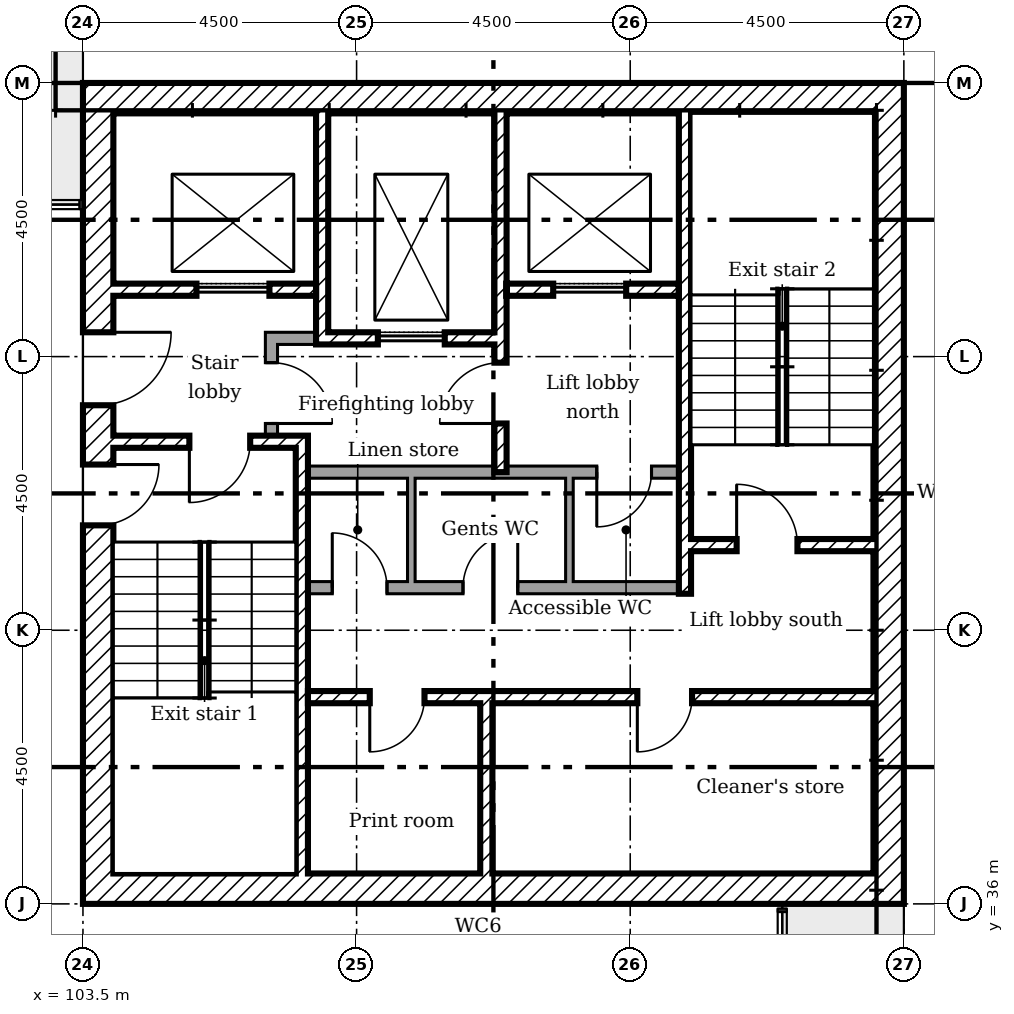
"""IFC4 building model, lengths in metres.
Left out: names, types, materials, properties, quantities, classifications, styles, units other than length and angle.
Written with IfcOpenShell. Run it as: python <this file> out.ifc"""

import sys

from ifc_helpers import new_model, si_unit, direction, frame, frame_2d, origin, place, context, subcontext, project, spatial, rectangle, extrude, element, fill, save


model = new_model("IFC4")
c1 = context("Model", 3, precision=1e-05, world=origin(), true_north=direction((0.0, 1.0)))
c2 = subcontext(c1, "Body", "Model", "MODEL_VIEW")
j1 = project(units=[si_unit("LENGTHUNIT", "METRE"), si_unit("PLANEANGLEUNIT", "RADIAN")], contexts=[c1])
p1 = place(None, origin())
s1 = spatial("IfcSite", under=j1, at=p1, CompositionType="ELEMENT")
p2 = place(p1, origin())
s2 = spatial("IfcBuilding", under=s1, at=p2, CompositionType="ELEMENT")
p3 = place(p2, frame((0.0, 0.0, 206.4)))
s3 = spatial("IfcBuildingStorey", under=s2, at=p3, CompositionType="ELEMENT", Elevation=206.4)
p4 = place(p3, frame((116.75, 36.0, 0.0), z_axis=(0.0, 0.0, 1.0), x_axis=(0.0, 1.0, 0.0)))
e1 = element("IfcWall", 1, at=p4, inside=s3, PredefinedType="SHEAR", context=c2, shape_type="SweptSolid", body=[
    extrude(rectangle(XDim=13.5, YDim=0.5, at=frame_2d((6.75, 0.0))), origin(), (0.0, 0.0, 1.0), 3.35),
])
for number, where in (
    (2, (103.5, 49.25, 0.0)),
    (3, (103.5, 36.25, 0.0)),
):
    element("IfcWall", number, at=place(p3, frame(where)), inside=s3, PredefinedType="SHEAR", context=c2, shape_type="SweptSolid", body=[
        extrude(rectangle(XDim=13.0, YDim=0.5, at=frame_2d((6.5, 0.0))), origin(), (0.0, 0.0, 1.0), 3.35),
    ])
p5 = place(p3, frame((103.75, 36.5, 0.0), z_axis=(0.0, 0.0, 1.0), x_axis=(0.0, 1.0, 0.0)))
e4 = element("IfcWall", 4, at=p5, inside=s3, PredefinedType="SHEAR", context=c2, shape_type="SweptSolid", body=[
    extrude(rectangle(XDim=12.5, YDim=0.5, at=frame_2d((6.25, 0.0))), origin(), (0.0, 0.0, 1.0), 3.35),
])
p6 = place(p5, frame((7.7, 0.0, 0.0)))
e5 = element("IfcOpeningElement", 5, at=p6, cuts=e4, PredefinedType="OPENING", context=c2, shape_type="SweptSolid", body=[
    extrude(rectangle(XDim=1.2, YDim=2.1, at=frame_2d((0.6, 1.05))), frame((0.0, 0.26, 0.0), z_axis=(0.0, -1.0, 0.0), x_axis=(1.0, 0.0, 0.0)), (0.0, 0.0, 1.0), 0.52),
])
p7 = place(p5, frame((5.725, 0.0, 0.0)))
e6 = element("IfcOpeningElement", 6, at=p7, cuts=e4, PredefinedType="OPENING", context=c2, shape_type="SweptSolid", body=[
    extrude(rectangle(XDim=1.0, YDim=2.1, at=frame_2d((0.5, 1.05))), frame((0.0, 0.26, 0.0), z_axis=(0.0, -1.0, 0.0), x_axis=(1.0, 0.0, 0.0)), (0.0, 0.0, 1.0), 0.52),
])
p8 = place(p3, frame((107.433, 49.0, 0.0), z_axis=(0.0, 0.0, 1.0), x_axis=(0.0, -1.0, 0.0)))
e7 = element("IfcWall", 7, at=p8, inside=s3, PredefinedType="SHEAR", context=c2, shape_type="SweptSolid", body=[
    extrude(rectangle(XDim=3.8, YDim=0.2, at=frame_2d((1.9, 0.0))), origin(), (0.0, 0.0, 1.0), 3.35),
])
p9 = place(p3, frame((110.367, 49.0, 0.0), z_axis=(0.0, 0.0, 1.0), x_axis=(0.0, -1.0, 0.0)))
e8 = element("IfcWall", 8, at=p9, inside=s3, PredefinedType="SHEAR", context=c2, shape_type="SweptSolid", body=[
    extrude(rectangle(XDim=5.9, YDim=0.2, at=frame_2d((2.95, 0.0))), origin(), (0.0, 0.0, 1.0), 3.35),
])
p10 = place(p9, frame((4.1, 0.0, 0.0)))
e9 = element("IfcOpeningElement", 9, at=p10, cuts=e8, PredefinedType="OPENING", context=c2, shape_type="SweptSolid", body=[
    extrude(rectangle(XDim=1.0, YDim=2.1, at=frame_2d((0.5, 1.05))), frame((0.0, 0.11, 0.0), z_axis=(0.0, -1.0, 0.0), x_axis=(1.0, 0.0, 0.0)), (0.0, 0.0, 1.0), 0.22),
])
p11 = place(p3, frame((110.133, 36.5, 0.0), z_axis=(0.0, 0.0, 1.0), x_axis=(0.0, 1.0, 0.0)))
e10 = element("IfcWall", 10, at=p11, inside=s3, PredefinedType="SHEAR", context=c2, shape_type="SweptSolid", body=[
    extrude(rectangle(XDim=2.8, YDim=0.2, at=frame_2d((1.4, 0.0))), origin(), (0.0, 0.0, 1.0), 3.35),
])
p12 = place(p3, frame((106.5, 45.3, 0.0)))
e11 = element("IfcWall", 11, at=p12, inside=s3, PredefinedType="PARTITIONING", context=c2, shape_type="SweptSolid", body=[
    extrude(rectangle(XDim=0.833, YDim=0.2, at=frame_2d((0.417, 0.0))), origin(), (0.0, 0.0, 1.0), 3.35),
])
p13 = place(p3, frame((106.6, 43.7, 0.0), z_axis=(0.0, 0.0, 1.0), x_axis=(0.0, 1.0, 0.0)))
e12 = element("IfcWall", 12, at=p13, inside=s3, PredefinedType="PARTITIONING", context=c2, shape_type="SweptSolid", body=[
    extrude(rectangle(XDim=1.5, YDim=0.2, at=frame_2d((0.75, 0.0))), origin(), (0.0, 0.0, 1.0), 3.35),
])
p14 = place(p13, frame((0.2, 0.0, 0.0)))
e13 = element("IfcOpeningElement", 13, at=p14, cuts=e12, PredefinedType="OPENING", context=c2, shape_type="SweptSolid", body=[
    extrude(rectangle(XDim=1.0, YDim=2.1, at=frame_2d((0.5, 1.05))), frame((0.0, 0.11, 0.0), z_axis=(0.0, -1.0, 0.0), x_axis=(1.0, 0.0, 0.0)), (0.0, 0.0, 1.0), 0.22),
])
p15 = place(p3, frame((104.0, 46.1, 0.0)))
e14 = element("IfcWall", 14, at=p15, inside=s3, PredefinedType="SHEAR", context=c2, shape_type="SweptSolid", body=[
    extrude(rectangle(XDim=3.333, YDim=0.2, at=frame_2d((1.667, 0.0))), origin(), (0.0, 0.0, 1.0), 3.35),
])
p16 = place(p15, frame((1.367, 0.0, 0.0)))
e15 = element("IfcOpeningElement", 15, at=p16, cuts=e14, PredefinedType="OPENING", context=c2, shape_type="SweptSolid", body=[
    extrude(rectangle(XDim=1.2, YDim=2.1, at=frame_2d((0.6, 1.05))), frame((0.0, 0.11, 0.0), z_axis=(0.0, -1.0, 0.0), x_axis=(1.0, 0.0, 0.0)), (0.0, 0.0, 1.0), 0.22),
])
p17 = place(p3, frame((110.467, 46.1, 0.0)))
e16 = element("IfcWall", 16, at=p17, inside=s3, PredefinedType="SHEAR", context=c2, shape_type="SweptSolid", body=[
    extrude(rectangle(XDim=2.833, YDim=0.2, at=frame_2d((1.417, 0.0))), origin(), (0.0, 0.0, 1.0), 3.35),
])
p18 = place(p17, frame((0.767, 0.0, 0.0)))
e17 = element("IfcOpeningElement", 17, at=p18, cuts=e16, PredefinedType="OPENING", context=c2, shape_type="SweptSolid", body=[
    extrude(rectangle(XDim=1.2, YDim=2.1, at=frame_2d((0.6, 1.05))), frame((0.0, 0.11, 0.0), z_axis=(0.0, -1.0, 0.0), x_axis=(1.0, 0.0, 0.0)), (0.0, 0.0, 1.0), 0.22),
])
p19 = place(p3, frame((107.533, 45.3, 0.0)))
e18 = element("IfcWall", 18, at=p19, inside=s3, PredefinedType="SHEAR", context=c2, shape_type="SweptSolid", body=[
    extrude(rectangle(XDim=2.733, YDim=0.2, at=frame_2d((1.367, 0.0))), origin(), (0.0, 0.0, 1.0), 3.35),
])
p20 = place(p19, frame((0.817, 0.0, 0.0)))
e19 = element("IfcOpeningElement", 19, at=p20, cuts=e18, PredefinedType="OPENING", context=c2, shape_type="SweptSolid", body=[
    extrude(rectangle(XDim=1.1, YDim=2.1, at=frame_2d((0.55, 1.05))), frame((0.0, 0.11, 0.0), z_axis=(0.0, -1.0, 0.0), x_axis=(1.0, 0.0, 0.0)), (0.0, 0.0, 1.0), 0.22),
])
p21 = place(p3, frame((107.2, 39.4, 0.0)))
e20 = element("IfcWall", 20, at=p21, inside=s3, PredefinedType="SHEAR", context=c2, shape_type="SweptSolid", body=[
    extrude(rectangle(XDim=9.3, YDim=0.2, at=frame_2d((4.65, 0.0))), origin(), (0.0, 0.0, 1.0), 3.35),
])
p22 = place(p21, frame((1.017, 0.0, 0.0)))
e21 = element("IfcOpeningElement", 21, at=p22, cuts=e20, PredefinedType="OPENING", context=c2, shape_type="SweptSolid", body=[
    extrude(rectangle(XDim=0.9, YDim=2.1, at=frame_2d((0.45, 1.05))), frame((0.0, 0.11, 0.0), z_axis=(0.0, -1.0, 0.0), x_axis=(1.0, 0.0, 0.0)), (0.0, 0.0, 1.0), 0.22),
])
p23 = place(p21, frame((5.417, 0.0, 0.0)))
e22 = element("IfcOpeningElement", 22, at=p23, cuts=e20, PredefinedType="OPENING", context=c2, shape_type="SweptSolid", body=[
    extrude(rectangle(XDim=0.9, YDim=2.1, at=frame_2d((0.45, 1.05))), frame((0.0, 0.11, 0.0), z_axis=(0.0, -1.0, 0.0), x_axis=(1.0, 0.0, 0.0)), (0.0, 0.0, 1.0), 0.22),
])
p24 = place(p3, frame((107.1, 36.5, 0.0), z_axis=(0.0, 0.0, 1.0), x_axis=(0.0, 1.0, 0.0)))
e23 = element("IfcWall", 23, at=p24, inside=s3, PredefinedType="SHEAR", context=c2, shape_type="SweptSolid", body=[
    extrude(rectangle(XDim=7.2, YDim=0.2, at=frame_2d((3.6, 0.0))), origin(), (0.0, 0.0, 1.0), 3.35),
])
p25 = place(p3, frame((104.0, 43.6, 0.0)))
e24 = element("IfcWall", 24, at=p25, inside=s3, PredefinedType="SHEAR", context=c2, shape_type="SweptSolid", body=[
    extrude(rectangle(XDim=3.0, YDim=0.2, at=frame_2d((1.5, 0.0))), origin(), (0.0, 0.0, 1.0), 3.35),
])
p26 = place(p25, frame((1.25, 0.0, 0.0)))
e25 = element("IfcOpeningElement", 25, at=p26, cuts=e24, PredefinedType="OPENING", context=c2, shape_type="SweptSolid", body=[
    extrude(rectangle(XDim=1.0, YDim=2.1, at=frame_2d((0.5, 1.05))), frame((0.0, 0.11, 0.0), z_axis=(0.0, -1.0, 0.0), x_axis=(1.0, 0.0, 0.0)), (0.0, 0.0, 1.0), 0.22),
])
p27 = place(p3, frame((113.5, 41.9, 0.0)))
e26 = element("IfcWall", 26, at=p27, inside=s3, PredefinedType="SHEAR", context=c2, shape_type="SweptSolid", body=[
    extrude(rectangle(XDim=3.0, YDim=0.2, at=frame_2d((1.5, 0.0))), origin(), (0.0, 0.0, 1.0), 3.35),
])
p28 = place(p27, frame((0.75, 0.0, 0.0)))
e27 = element("IfcOpeningElement", 27, at=p28, cuts=e26, PredefinedType="OPENING", context=c2, shape_type="SweptSolid", body=[
    extrude(rectangle(XDim=1.0, YDim=2.1, at=frame_2d((0.5, 1.05))), frame((0.0, 0.11, 0.0), z_axis=(0.0, -1.0, 0.0), x_axis=(1.0, 0.0, 0.0)), (0.0, 0.0, 1.0), 0.22),
])
p29 = place(p3, frame((113.4, 41.1, 0.0), z_axis=(0.0, 0.0, 1.0), x_axis=(0.0, 1.0, 0.0)))
e28 = element("IfcWall", 28, at=p29, inside=s3, PredefinedType="SHEAR", context=c2, shape_type="SweptSolid", body=[
    extrude(rectangle(XDim=7.9, YDim=0.2, at=frame_2d((3.95, 0.0))), origin(), (0.0, 0.0, 1.0), 3.35),
])
p30 = place(p3, frame((107.2, 43.1, 0.0)))
e29 = element("IfcWall", 29, at=p30, inside=s3, PredefinedType="PARTITIONING", context=c2, shape_type="SweptSolid", body=[
    extrude(rectangle(XDim=6.1, YDim=0.2, at=frame_2d((3.05, 0.0))), origin(), (0.0, 0.0, 1.0), 3.35),
])
p31 = place(p30, frame((4.75, 0.0, 0.0)))
e30 = element("IfcOpeningElement", 30, at=p31, cuts=e29, PredefinedType="OPENING", context=c2, shape_type="SweptSolid", body=[
    extrude(rectangle(XDim=0.9, YDim=2.1, at=frame_2d((0.45, 1.05))), frame((0.0, 0.11, 0.0), z_axis=(0.0, -1.0, 0.0), x_axis=(1.0, 0.0, 0.0)), (0.0, 0.0, 1.0), 0.22),
])
p32 = place(p3, frame((107.2, 41.2, 0.0)))
e31 = element("IfcWall", 31, at=p32, inside=s3, PredefinedType="PARTITIONING", context=c2, shape_type="SweptSolid", body=[
    extrude(rectangle(XDim=6.1, YDim=0.2, at=frame_2d((3.05, 0.0))), origin(), (0.0, 0.0, 1.0), 3.35),
])
p33 = place(p32, frame((0.4, 0.0, 0.0)))
e32 = element("IfcOpeningElement", 32, at=p33, cuts=e31, PredefinedType="OPENING", context=c2, shape_type="SweptSolid", body=[
    extrude(rectangle(XDim=0.9, YDim=2.1, at=frame_2d((0.45, 1.05))), frame((0.0, 0.11, 0.0), z_axis=(0.0, -1.0, 0.0), x_axis=(1.0, 0.0, 0.0)), (0.0, 0.0, 1.0), 0.22),
])
p34 = place(p32, frame((2.55, 0.0, 0.0)))
e33 = element("IfcOpeningElement", 33, at=p34, cuts=e31, PredefinedType="OPENING", context=c2, shape_type="SweptSolid", body=[
    extrude(rectangle(XDim=0.9, YDim=2.1, at=frame_2d((0.45, 1.05))), frame((0.0, 0.11, 0.0), z_axis=(0.0, -1.0, 0.0), x_axis=(1.0, 0.0, 0.0)), (0.0, 0.0, 1.0), 0.22),
])
for number, where, z_axis, x_axis in (
    (34, (108.9, 41.3, 0.0), (0.0, 0.0, 1.0), (0.0, 1.0, 0.0)),
    (35, (111.5, 41.3, 0.0), (0.0, 0.0, 1.0), (0.0, 1.0, 0.0)),
):
    element("IfcWall", number, at=place(p3, frame(where, z_axis=z_axis, x_axis=x_axis)), inside=s3, PredefinedType="PARTITIONING", context=c2, shape_type="SweptSolid", body=[
        extrude(rectangle(XDim=1.7, YDim=0.125, at=frame_2d((0.85, 0.0))), origin(), (0.0, 0.0, 1.0), 3.35),
    ])
p35 = place(p6, frame((1.2, 0.0, 0.0), x_axis=(-1.0, 0.0, 0.0)))
e36 = element("IfcDoor", 36, at=p35, inside=s3, OperationType="SINGLE_SWING_RIGHT", PredefinedType="DOOR", context=c2, shape_type="SweptSolid", body=[
    extrude(rectangle(XDim=1.2, YDim=2.1, at=frame_2d((0.6, 1.05))), frame((0.0, 0.025, 0.0), z_axis=(0.0, -1.0, 0.0), x_axis=(1.0, 0.0, 0.0)), (0.0, 0.0, 1.0), 0.05),
])
fill(e5, e36)
p36 = place(p26, frame((1.0, 0.0, 0.0), x_axis=(-1.0, 0.0, 0.0)))
e37 = element("IfcDoor", 37, at=p36, inside=s3, OperationType="SINGLE_SWING_LEFT", PredefinedType="DOOR", context=c2, shape_type="SweptSolid", body=[
    extrude(rectangle(XDim=1.0, YDim=2.1, at=frame_2d((0.5, 1.05))), frame((0.0, 0.025, 0.0), z_axis=(0.0, -1.0, 0.0), x_axis=(1.0, 0.0, 0.0)), (0.0, 0.0, 1.0), 0.05),
])
fill(e25, e37)
p37 = place(p7, frame((1.0, 0.0, 0.0), x_axis=(-1.0, 0.0, 0.0)))
e38 = element("IfcDoor", 38, at=p37, inside=s3, OperationType="SINGLE_SWING_RIGHT", PredefinedType="DOOR", context=c2, shape_type="SweptSolid", body=[
    extrude(rectangle(XDim=1.0, YDim=2.1, at=frame_2d((0.5, 1.05))), frame((0.0, 0.025, 0.0), z_axis=(0.0, -1.0, 0.0), x_axis=(1.0, 0.0, 0.0)), (0.0, 0.0, 1.0), 0.05),
])
fill(e6, e38)
p38 = place(p28, origin())
e39 = element("IfcDoor", 39, at=p38, inside=s3, OperationType="SINGLE_SWING_RIGHT", PredefinedType="DOOR", context=c2, shape_type="SweptSolid", body=[
    extrude(rectangle(XDim=1.0, YDim=2.1, at=frame_2d((0.5, 1.05))), frame((0.0, 0.025, 0.0), z_axis=(0.0, -1.0, 0.0), x_axis=(1.0, 0.0, 0.0)), (0.0, 0.0, 1.0), 0.05),
])
fill(e27, e39)
p39 = place(p10, frame((1.0, 0.0, 0.0), x_axis=(-1.0, 0.0, 0.0)))
e40 = element("IfcDoor", 40, at=p39, inside=s3, OperationType="SINGLE_SWING_RIGHT", PredefinedType="DOOR", context=c2, shape_type="SweptSolid", body=[
    extrude(rectangle(XDim=1.0, YDim=2.1, at=frame_2d((0.5, 1.05))), frame((0.0, 0.025, 0.0), z_axis=(0.0, -1.0, 0.0), x_axis=(1.0, 0.0, 0.0)), (0.0, 0.0, 1.0), 0.05),
])
fill(e9, e40)
p40 = place(p14, frame((1.0, 0.0, 0.0), x_axis=(-1.0, 0.0, 0.0)))
e41 = element("IfcDoor", 41, at=p40, inside=s3, OperationType="SINGLE_SWING_LEFT", PredefinedType="DOOR", context=c2, shape_type="SweptSolid", body=[
    extrude(rectangle(XDim=1.0, YDim=2.1, at=frame_2d((0.5, 1.05))), frame((0.0, 0.025, 0.0), z_axis=(0.0, -1.0, 0.0), x_axis=(1.0, 0.0, 0.0)), (0.0, 0.0, 1.0), 0.05),
])
fill(e13, e41)
p41 = place(p22, frame((0.9, 0.0, 0.0), x_axis=(-1.0, 0.0, 0.0)))
e42 = element("IfcDoor", 42, at=p41, inside=s3, OperationType="SINGLE_SWING_LEFT", PredefinedType="DOOR", context=c2, shape_type="SweptSolid", body=[
    extrude(rectangle(XDim=0.9, YDim=2.1, at=frame_2d((0.45, 1.05))), frame((0.0, 0.025, 0.0), z_axis=(0.0, -1.0, 0.0), x_axis=(1.0, 0.0, 0.0)), (0.0, 0.0, 1.0), 0.05),
])
fill(e21, e42)
p42 = place(p23, frame((0.9, 0.0, 0.0), x_axis=(-1.0, 0.0, 0.0)))
e43 = element("IfcDoor", 43, at=p42, inside=s3, OperationType="SINGLE_SWING_LEFT", PredefinedType="DOOR", context=c2, shape_type="SweptSolid", body=[
    extrude(rectangle(XDim=0.9, YDim=2.1, at=frame_2d((0.45, 1.05))), frame((0.0, 0.025, 0.0), z_axis=(0.0, -1.0, 0.0), x_axis=(1.0, 0.0, 0.0)), (0.0, 0.0, 1.0), 0.05),
])
fill(e22, e43)
p43 = place(p33, origin())
e44 = element("IfcDoor", 44, at=p43, inside=s3, OperationType="SINGLE_SWING_RIGHT", PredefinedType="DOOR", context=c2, shape_type="SweptSolid", body=[
    extrude(rectangle(XDim=0.9, YDim=2.1, at=frame_2d((0.45, 1.05))), frame((0.0, 0.025, 0.0), z_axis=(0.0, -1.0, 0.0), x_axis=(1.0, 0.0, 0.0)), (0.0, 0.0, 1.0), 0.05),
])
fill(e32, e44)
p44 = place(p34, origin())
e45 = element("IfcDoor", 45, at=p44, inside=s3, OperationType="SINGLE_SWING_LEFT", PredefinedType="DOOR", context=c2, shape_type="SweptSolid", body=[
    extrude(rectangle(XDim=0.9, YDim=2.1, at=frame_2d((0.45, 1.05))), frame((0.0, 0.025, 0.0), z_axis=(0.0, -1.0, 0.0), x_axis=(1.0, 0.0, 0.0)), (0.0, 0.0, 1.0), 0.05),
])
fill(e33, e45)
p45 = place(p31, frame((0.9, 0.0, 0.0), x_axis=(-1.0, 0.0, 0.0)))
e46 = element("IfcDoor", 46, at=p45, inside=s3, OperationType="SINGLE_SWING_LEFT", PredefinedType="DOOR", context=c2, shape_type="SweptSolid", body=[
    extrude(rectangle(XDim=0.9, YDim=2.1, at=frame_2d((0.45, 1.05))), frame((0.0, 0.025, 0.0), z_axis=(0.0, -1.0, 0.0), x_axis=(1.0, 0.0, 0.0)), (0.0, 0.0, 1.0), 0.05),
])
fill(e30, e46)
p46 = place(p20, origin())
e47 = element("IfcDoor", 47, at=p46, inside=s3, OperationType="SLIDING_TO_LEFT", PredefinedType="DOOR", context=c2, shape_type="SweptSolid", body=[
    extrude(rectangle(XDim=1.1, YDim=2.1, at=frame_2d((0.55, 1.05))), frame((0.0, 0.025, 0.0), z_axis=(0.0, -1.0, 0.0), x_axis=(1.0, 0.0, 0.0)), (0.0, 0.0, 1.0), 0.05),
])
fill(e19, e47)
p47 = place(p16, origin())
e48 = element("IfcDoor", 48, at=p47, inside=s3, OperationType="SLIDING_TO_LEFT", PredefinedType="DOOR", context=c2, shape_type="SweptSolid", body=[
    extrude(rectangle(XDim=1.2, YDim=2.1, at=frame_2d((0.6, 1.05))), frame((0.0, 0.025, 0.0), z_axis=(0.0, -1.0, 0.0), x_axis=(1.0, 0.0, 0.0)), (0.0, 0.0, 1.0), 0.05),
])
fill(e15, e48)
p48 = place(p18, origin())
e49 = element("IfcDoor", 49, at=p48, inside=s3, OperationType="SLIDING_TO_LEFT", PredefinedType="DOOR", context=c2, shape_type="SweptSolid", body=[
    extrude(rectangle(XDim=1.2, YDim=2.1, at=frame_2d((0.6, 1.05))), frame((0.0, 0.025, 0.0), z_axis=(0.0, -1.0, 0.0), x_axis=(1.0, 0.0, 0.0)), (0.0, 0.0, 1.0), 0.05),
])
fill(e17, e49)
save(model, sys.argv[1])
